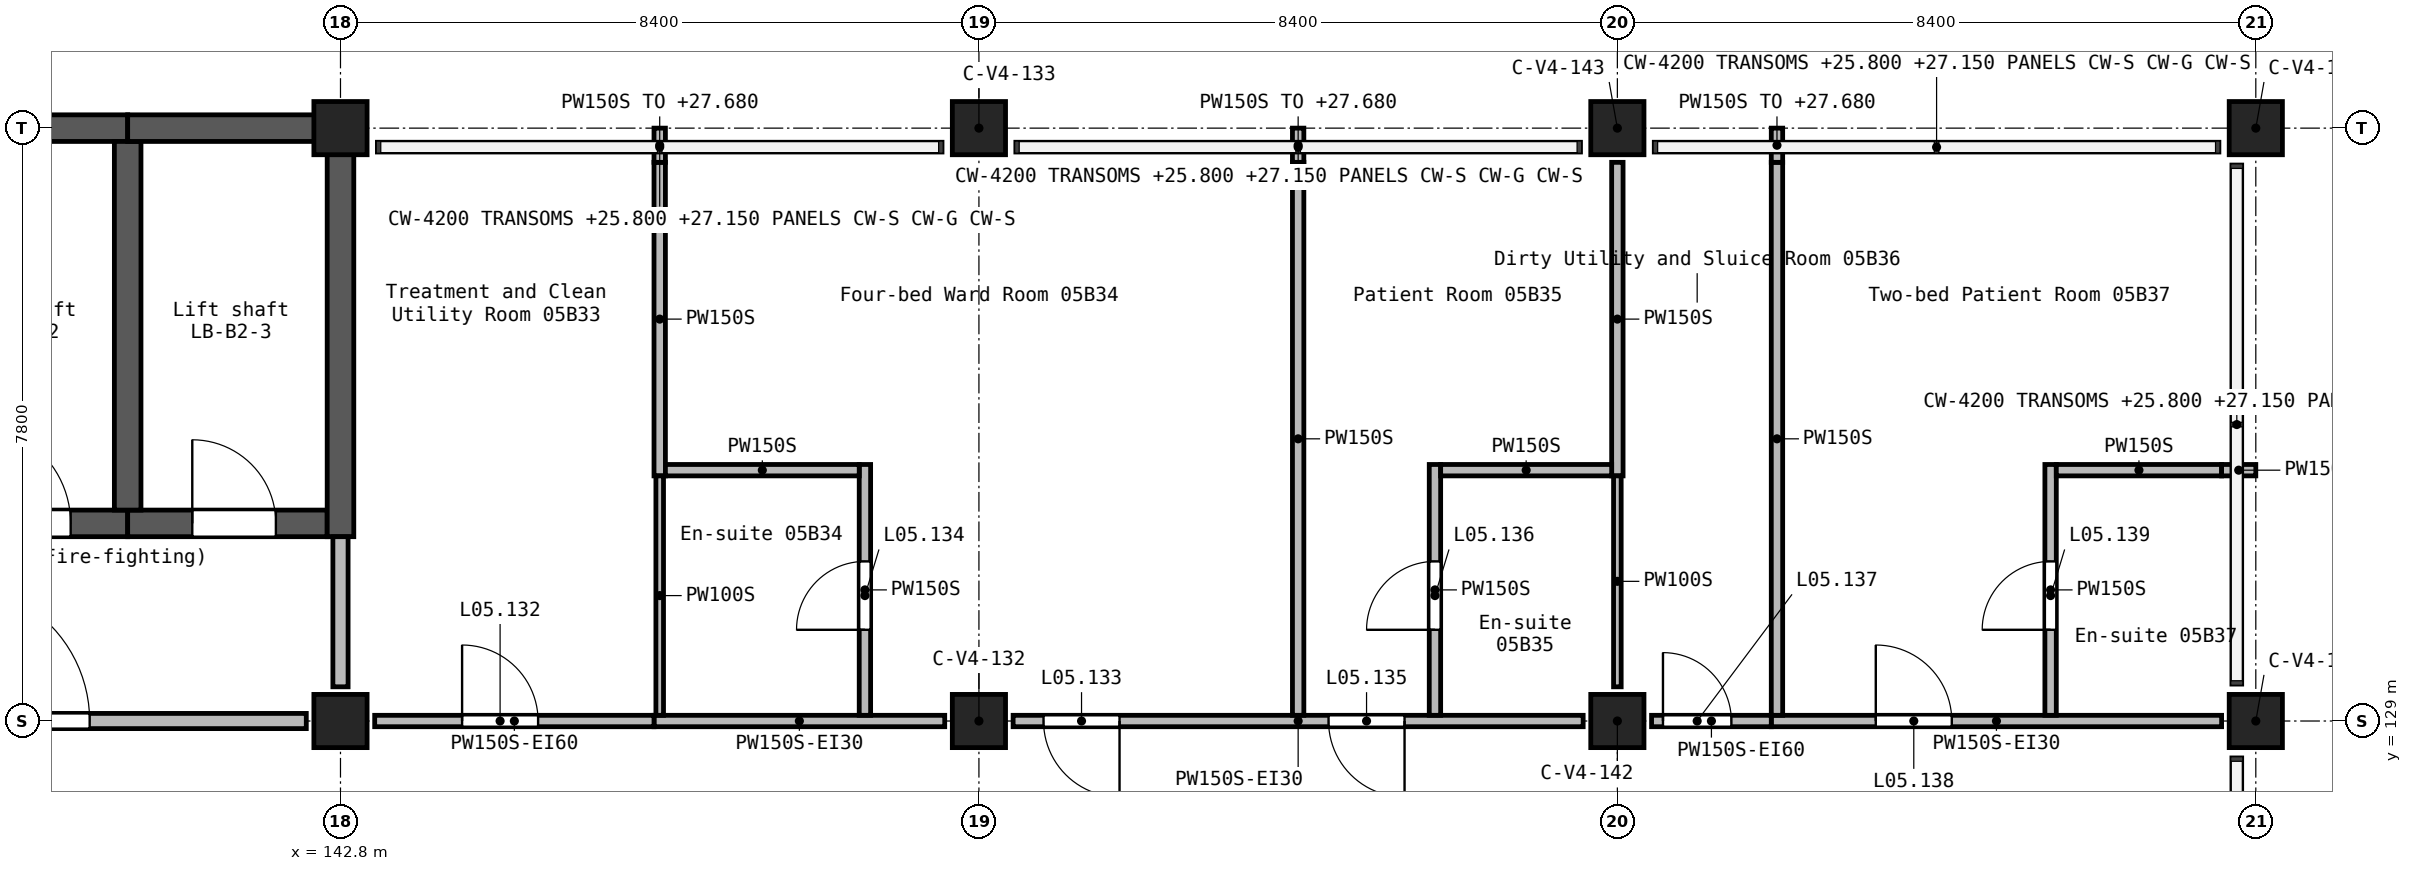
"""IFC4 building model, lengths in metres.
Left out: names, types, materials, properties, quantities, classifications, styles, units other than length and angle.
Written with IfcOpenShell. Run it as: python <this file> out.ifc"""

import sys

from ifc_helpers import new_model, si_unit, direction, frame, frame_2d, origin, origin_2d, place, context, subcontext, project, spatial, rectangle, extrude, element, fill, save


model = new_model("IFC4")
c1 = context("Model", 3, precision=1e-05, world=origin(), true_north=direction((0.0, 1.0)))
c2 = subcontext(c1, "Body", "Model", "MODEL_VIEW")
j1 = project(units=[si_unit("LENGTHUNIT", "METRE"), si_unit("PLANEANGLEUNIT", "RADIAN")], contexts=[c1])
p1 = place(None, origin())
s1 = spatial("IfcSite", under=j1, at=p1, CompositionType="ELEMENT")
p2 = place(p1, origin())
s2 = spatial("IfcBuilding", under=s1, at=p2, CompositionType="ELEMENT")
p3 = place(p2, frame((0.0, 0.0, 24.9)))
s3 = spatial("IfcBuildingStorey", under=s2, at=p3, CompositionType="ELEMENT", Elevation=24.9)
for number, where, z_axis, x_axis in (
    (1, (142.8, 129.0, 0.0), (0.0, 0.0, 1.0), (1.0, 0.0, 0.0)),
    (2, (142.8, 136.8, 0.0), (0.0, 0.0, 1.0), (1.0, 0.0, 0.0)),
    (3, (151.2, 129.0, 0.0), (0.0, 0.0, 1.0), (1.0, 0.0, 0.0)),
    (4, (151.2, 136.8, 0.0), (0.0, 0.0, 1.0), (1.0, 0.0, 0.0)),
    (5, (159.6, 129.0, 0.0), (0.0, 0.0, 1.0), (1.0, 0.0, 0.0)),
    (6, (159.6, 136.8, 0.0), (0.0, 0.0, 1.0), (1.0, 0.0, 0.0)),
    (7, (168.0, 129.0, 0.0), (0.0, 0.0, 1.0), (1.0, 0.0, 0.0)),
    (8, (168.0, 136.8, 0.0), (0.0, 0.0, 1.0), (1.0, 0.0, 0.0)),
):
    element("IfcColumn", number, at=place(p3, frame(where, z_axis=z_axis, x_axis=x_axis)), inside=s3, PredefinedType="COLUMN", context=c2, shape_type="SweptSolid", body=[
        extrude(rectangle(XDim=0.7, YDim=0.7, at=origin_2d()), origin(), (0.0, 0.0, 1.0), 3.9),
    ])
p4 = place(p3, frame((137.2, 131.6, 0.0), z_axis=(0.0, 0.0, 1.0), x_axis=(1.0, 0.0, 0.0)))
e9 = element("IfcWall", 9, at=p4, inside=s3, PredefinedType="SHEAR", context=c2, shape_type="SweptSolid", body=[
    extrude(rectangle(XDim=2.8, YDim=0.35, at=frame_2d((1.4, 0.0))), origin(), (0.0, 0.0, 1.0), 3.9),
])
p5 = place(p4, frame((0.75, 0.0, 0.0)))
e10 = element("IfcOpeningElement", 10, at=p5, cuts=e9, PredefinedType="OPENING", context=c2, shape_type="SweptSolid", body=[
    extrude(rectangle(XDim=1.3, YDim=2.1, at=frame_2d((0.65, 1.05))), frame((0.0, 0.185, 0.0), z_axis=(0.0, -1.0, 0.0), x_axis=(1.0, 0.0, 0.0)), (0.0, 0.0, 1.0), 0.37),
])
p6 = place(p3, frame((137.2, 136.8, 0.0), z_axis=(0.0, 0.0, 1.0), x_axis=(1.0, 0.0, 0.0)))
e11 = element("IfcWall", 11, at=p6, inside=s3, PredefinedType="SHEAR", context=c2, shape_type="SweptSolid", body=[
    extrude(rectangle(XDim=2.8, YDim=0.35, at=frame_2d((1.4, 0.0))), origin(), (0.0, 0.0, 1.0), 3.9),
])
p7 = place(p3, frame((140.0, 131.6, 0.0), z_axis=(0.0, 0.0, 1.0), x_axis=(1.0, 0.0, 0.0)))
e12 = element("IfcWall", 12, at=p7, inside=s3, PredefinedType="SHEAR", context=c2, shape_type="SweptSolid", body=[
    extrude(rectangle(XDim=2.625, YDim=0.35, at=frame_2d((1.312, 0.0))), origin(), (0.0, 0.0, 1.0), 3.9),
])
p8 = place(p7, frame((0.85, 0.0, 0.0)))
e13 = element("IfcOpeningElement", 13, at=p8, cuts=e12, PredefinedType="OPENING", context=c2, shape_type="SweptSolid", body=[
    extrude(rectangle(XDim=1.1, YDim=2.1, at=frame_2d((0.55, 1.05))), frame((0.0, 0.185, 0.0), z_axis=(0.0, -1.0, 0.0), x_axis=(1.0, 0.0, 0.0)), (0.0, 0.0, 1.0), 0.37),
])
p9 = place(p3, frame((140.0, 131.775, 0.0), z_axis=(0.0, 0.0, 1.0), x_axis=(0.0, 1.0, 0.0)))
e14 = element("IfcWall", 14, at=p9, inside=s3, PredefinedType="SHEAR", context=c2, shape_type="SweptSolid", body=[
    extrude(rectangle(XDim=4.85, YDim=0.35, at=frame_2d((2.425, 0.0))), origin(), (0.0, 0.0, 1.0), 3.9),
])
p10 = place(p3, frame((140.0, 136.8, 0.0), z_axis=(0.0, 0.0, 1.0), x_axis=(1.0, 0.0, 0.0)))
e15 = element("IfcWall", 15, at=p10, inside=s3, PredefinedType="SHEAR", context=c2, shape_type="SweptSolid", body=[
    extrude(rectangle(XDim=2.625, YDim=0.35, at=frame_2d((1.312, 0.0))), origin(), (0.0, 0.0, 1.0), 3.9),
])
p11 = place(p3, frame((142.8, 131.425, 0.0), z_axis=(0.0, 0.0, 1.0), x_axis=(0.0, 1.0, 0.0)))
e16 = element("IfcWall", 16, at=p11, inside=s3, PredefinedType="SHEAR", context=c2, shape_type="SweptSolid", body=[
    extrude(rectangle(XDim=5.55, YDim=0.35, at=frame_2d((2.775, 0.0))), origin(), (0.0, 0.0, 1.0), 3.9),
])
p12 = place(p3, frame((134.85, 129.0, 0.0), z_axis=(0.0, 0.0, 1.0), x_axis=(1.0, 0.0, 0.0)))
e17 = element("IfcWall", 17, at=p12, inside=s3, PredefinedType="SOLIDWALL", context=c2, shape_type="SweptSolid", body=[
    extrude(rectangle(XDim=7.5, YDim=0.2, at=frame_2d((3.75, 0.0))), origin(), (0.0, 0.0, 1.0), 3.6),
])
p13 = place(p12, frame((2.85, 0.0, 0.0)))
e18 = element("IfcOpeningElement", 18, at=p13, cuts=e17, PredefinedType="OPENING", context=c2, shape_type="SweptSolid", body=[
    extrude(rectangle(XDim=1.8, YDim=2.1, at=frame_2d((0.9, 1.05))), frame((0.0, 0.11, 0.0), z_axis=(0.0, -1.0, 0.0), x_axis=(1.0, 0.0, 0.0)), (0.0, 0.0, 1.0), 0.22),
])
p14 = place(p3, frame((142.8, 129.45, 0.0), z_axis=(0.0, 0.0, 1.0), x_axis=(0.0, 1.0, 0.0)))
e19 = element("IfcWall", 19, at=p14, inside=s3, PredefinedType="SOLIDWALL", context=c2, shape_type="SweptSolid", body=[
    extrude(rectangle(XDim=1.975, YDim=0.2, at=frame_2d((0.988, 0.0))), origin(), (0.0, 0.0, 1.0), 3.6),
])
p15 = place(p3, frame((159.15, 129.0, 0.0), z_axis=(0.0, 0.0, 1.0), x_axis=(-1.0, 0.0, 0.0)))
e20 = element("IfcWall", 20, at=p15, inside=s3, PredefinedType="PARTITIONING", context=c2, shape_type="SweptSolid", body=[
    extrude(rectangle(XDim=7.5, YDim=0.15, at=frame_2d((3.75, 0.0))), origin(), (0.0, 0.0, 1.0), 3.6),
])
p16 = place(p15, frame((6.1, 0.0, 0.0)))
e21 = element("IfcOpeningElement", 21, at=p16, cuts=e20, PredefinedType="OPENING", context=c2, shape_type="SweptSolid", body=[
    extrude(rectangle(XDim=1.0, YDim=2.1, at=frame_2d((0.5, 1.05))), frame((0.0, 0.085, 0.0), z_axis=(0.0, -1.0, 0.0), x_axis=(1.0, 0.0, 0.0)), (0.0, 0.0, 1.0), 0.17),
])
p17 = place(p15, frame((2.35, 0.0, 0.0)))
e22 = element("IfcOpeningElement", 22, at=p17, cuts=e20, PredefinedType="OPENING", context=c2, shape_type="SweptSolid", body=[
    extrude(rectangle(XDim=1.0, YDim=2.1, at=frame_2d((0.5, 1.05))), frame((0.0, 0.085, 0.0), z_axis=(0.0, -1.0, 0.0), x_axis=(1.0, 0.0, 0.0)), (0.0, 0.0, 1.0), 0.17),
])
p18 = place(p3, frame((150.75, 129.0, 0.0), z_axis=(0.0, 0.0, 1.0), x_axis=(-1.0, 0.0, 0.0)))
e23 = element("IfcWall", 23, at=p18, inside=s3, PredefinedType="PARTITIONING", context=c2, shape_type="SweptSolid", body=[
    extrude(rectangle(XDim=3.825, YDim=0.15, at=frame_2d((1.913, 0.0))), origin(), (0.0, 0.0, 1.0), 3.6),
])
p19 = place(p3, frame((161.625, 129.0, 0.0), z_axis=(0.0, 0.0, 1.0), x_axis=(1.0, 0.0, 0.0)))
e24 = element("IfcWall", 24, at=p19, inside=s3, PredefinedType="PARTITIONING", context=c2, shape_type="SweptSolid", body=[
    extrude(rectangle(XDim=5.925, YDim=0.15, at=frame_2d((2.962, 0.0))), origin(), (0.0, 0.0, 1.0), 3.6),
])
p20 = place(p19, frame((1.375, 0.0, 0.0)))
e25 = element("IfcOpeningElement", 25, at=p20, cuts=e24, PredefinedType="OPENING", context=c2, shape_type="SweptSolid", body=[
    extrude(rectangle(XDim=1.0, YDim=2.1, at=frame_2d((0.5, 1.05))), frame((0.0, 0.085, 0.0), z_axis=(0.0, -1.0, 0.0), x_axis=(1.0, 0.0, 0.0)), (0.0, 0.0, 1.0), 0.17),
])
p21 = place(p3, frame((143.25, 129.0, 0.0), z_axis=(0.0, 0.0, 1.0), x_axis=(1.0, 0.0, 0.0)))
e26 = element("IfcWall", 26, at=p21, inside=s3, PredefinedType="PARTITIONING", context=c2, shape_type="SweptSolid", body=[
    extrude(rectangle(XDim=3.675, YDim=0.15, at=frame_2d((1.837, 0.0))), origin(), (0.0, 0.0, 1.0), 3.6),
])
p22 = place(p21, frame((1.15, 0.0, 0.0)))
e27 = element("IfcOpeningElement", 27, at=p22, cuts=e26, PredefinedType="OPENING", context=c2, shape_type="SweptSolid", body=[
    extrude(rectangle(XDim=1.0, YDim=2.1, at=frame_2d((0.5, 1.05))), frame((0.0, 0.085, 0.0), z_axis=(0.0, -1.0, 0.0), x_axis=(1.0, 0.0, 0.0)), (0.0, 0.0, 1.0), 0.17),
])
p23 = place(p3, frame((160.05, 129.0, 0.0), z_axis=(0.0, 0.0, 1.0), x_axis=(1.0, 0.0, 0.0)))
e28 = element("IfcWall", 28, at=p23, inside=s3, PredefinedType="PARTITIONING", context=c2, shape_type="SweptSolid", body=[
    extrude(rectangle(XDim=1.575, YDim=0.15, at=frame_2d((0.788, 0.0))), origin(), (0.0, 0.0, 1.0), 3.6),
])
p24 = place(p23, frame((0.15, 0.0, 0.0)))
e29 = element("IfcOpeningElement", 29, at=p24, cuts=e28, PredefinedType="OPENING", context=c2, shape_type="SweptSolid", body=[
    extrude(rectangle(XDim=0.9, YDim=2.1, at=frame_2d((0.45, 1.05))), frame((0.0, 0.085, 0.0), z_axis=(0.0, -1.0, 0.0), x_axis=(1.0, 0.0, 0.0)), (0.0, 0.0, 1.0), 0.17),
])
p25 = place(p3, frame((155.4, 129.075, 0.0), z_axis=(0.0, 0.0, 1.0), x_axis=(0.0, 1.0, 0.0)))
e30 = element("IfcWall", 30, at=p25, inside=s3, PredefinedType="PARTITIONING", context=c2, shape_type="SweptSolid", body=[
    extrude(rectangle(XDim=7.275, YDim=0.15, at=frame_2d((3.638, 0.0))), origin(), (0.0, 0.0, 1.0), 3.6),
])
p26 = place(p3, frame((155.4, 136.35, 0.0), z_axis=(0.0, 0.0, 1.0), x_axis=(0.0, 1.0, 0.0)))
e31 = element("IfcWall", 31, at=p26, inside=s3, PredefinedType="PARTITIONING", context=c2, shape_type="SweptSolid", body=[
    extrude(rectangle(XDim=0.45, YDim=0.15, at=frame_2d((0.225, 0.0))), origin(), (0.0, 0.0, 1.0), 2.78),
])
p27 = place(p3, frame((161.7, 129.075, 0.0), z_axis=(0.0, 0.0, 1.0), x_axis=(0.0, 1.0, 0.0)))
e32 = element("IfcWall", 32, at=p27, inside=s3, PredefinedType="PARTITIONING", context=c2, shape_type="SweptSolid", body=[
    extrude(rectangle(XDim=7.275, YDim=0.15, at=frame_2d((3.638, 0.0))), origin(), (0.0, 0.0, 1.0), 3.6),
])
p28 = place(p3, frame((161.7, 136.35, 0.0), z_axis=(0.0, 0.0, 1.0), x_axis=(0.0, 1.0, 0.0)))
e33 = element("IfcWall", 33, at=p28, inside=s3, PredefinedType="PARTITIONING", context=c2, shape_type="SweptSolid", body=[
    extrude(rectangle(XDim=0.45, YDim=0.15, at=frame_2d((0.225, 0.0))), origin(), (0.0, 0.0, 1.0), 2.78),
])
p29 = place(p3, frame((147.0, 132.225, 0.0), z_axis=(0.0, 0.0, 1.0), x_axis=(0.0, 1.0, 0.0)))
e34 = element("IfcWall", 34, at=p29, inside=s3, PredefinedType="PARTITIONING", context=c2, shape_type="SweptSolid", body=[
    extrude(rectangle(XDim=4.125, YDim=0.15, at=frame_2d((2.062, 0.0))), origin(), (0.0, 0.0, 1.0), 3.6),
])
p30 = place(p3, frame((147.0, 136.35, 0.0), z_axis=(0.0, 0.0, 1.0), x_axis=(0.0, 1.0, 0.0)))
e35 = element("IfcWall", 35, at=p30, inside=s3, PredefinedType="PARTITIONING", context=c2, shape_type="SweptSolid", body=[
    extrude(rectangle(XDim=0.45, YDim=0.15, at=frame_2d((0.225, 0.0))), origin(), (0.0, 0.0, 1.0), 2.78),
])
p31 = place(p3, frame((159.6, 132.225, 0.0), z_axis=(0.0, 0.0, 1.0), x_axis=(0.0, 1.0, 0.0)))
e36 = element("IfcWall", 36, at=p31, inside=s3, PredefinedType="PARTITIONING", context=c2, shape_type="SweptSolid", body=[
    extrude(rectangle(XDim=4.125, YDim=0.15, at=frame_2d((2.062, 0.0))), origin(), (0.0, 0.0, 1.0), 3.6),
])
p32 = place(p3, frame((149.7, 129.075, 0.0), z_axis=(0.0, 0.0, 1.0), x_axis=(0.0, 1.0, 0.0)))
e37 = element("IfcWall", 37, at=p32, inside=s3, PredefinedType="PARTITIONING", context=c2, shape_type="SweptSolid", body=[
    extrude(rectangle(XDim=3.3, YDim=0.15, at=frame_2d((1.65, 0.0))), origin(), (0.0, 0.0, 1.0), 3.6),
])
p33 = place(p32, frame((1.125, 0.0, 0.0)))
e38 = element("IfcOpeningElement", 38, at=p33, cuts=e37, PredefinedType="OPENING", context=c2, shape_type="SweptSolid", body=[
    extrude(rectangle(XDim=0.9, YDim=2.1, at=frame_2d((0.45, 1.05))), frame((0.0, 0.085, 0.0), z_axis=(0.0, -1.0, 0.0), x_axis=(1.0, 0.0, 0.0)), (0.0, 0.0, 1.0), 0.17),
])
p34 = place(p3, frame((157.2, 129.075, 0.0), z_axis=(0.0, 0.0, 1.0), x_axis=(0.0, 1.0, 0.0)))
e39 = element("IfcWall", 39, at=p34, inside=s3, PredefinedType="PARTITIONING", context=c2, shape_type="SweptSolid", body=[
    extrude(rectangle(XDim=3.3, YDim=0.15, at=frame_2d((1.65, 0.0))), origin(), (0.0, 0.0, 1.0), 3.6),
])
p35 = place(p34, frame((1.125, 0.0, 0.0)))
e40 = element("IfcOpeningElement", 40, at=p35, cuts=e39, PredefinedType="OPENING", context=c2, shape_type="SweptSolid", body=[
    extrude(rectangle(XDim=0.9, YDim=2.1, at=frame_2d((0.45, 1.05))), frame((0.0, 0.085, 0.0), z_axis=(0.0, -1.0, 0.0), x_axis=(1.0, 0.0, 0.0)), (0.0, 0.0, 1.0), 0.17),
])
p36 = place(p3, frame((165.3, 129.075, 0.0), z_axis=(0.0, 0.0, 1.0), x_axis=(0.0, 1.0, 0.0)))
e41 = element("IfcWall", 41, at=p36, inside=s3, PredefinedType="PARTITIONING", context=c2, shape_type="SweptSolid", body=[
    extrude(rectangle(XDim=3.3, YDim=0.15, at=frame_2d((1.65, 0.0))), origin(), (0.0, 0.0, 1.0), 3.6),
])
p37 = place(p36, frame((1.125, 0.0, 0.0)))
e42 = element("IfcOpeningElement", 42, at=p37, cuts=e41, PredefinedType="OPENING", context=c2, shape_type="SweptSolid", body=[
    extrude(rectangle(XDim=0.9, YDim=2.1, at=frame_2d((0.45, 1.05))), frame((0.0, 0.085, 0.0), z_axis=(0.0, -1.0, 0.0), x_axis=(1.0, 0.0, 0.0)), (0.0, 0.0, 1.0), 0.17),
])
p38 = place(p3, frame((147.075, 132.3, 0.0), z_axis=(0.0, 0.0, 1.0), x_axis=(1.0, 0.0, 0.0)))
e43 = element("IfcWall", 43, at=p38, inside=s3, PredefinedType="PARTITIONING", context=c2, shape_type="SweptSolid", body=[
    extrude(rectangle(XDim=2.55, YDim=0.15, at=frame_2d((1.275, 0.0))), origin(), (0.0, 0.0, 1.0), 3.6),
])
p39 = place(p3, frame((165.375, 132.3, 0.0), z_axis=(0.0, 0.0, 1.0), x_axis=(1.0, 0.0, 0.0)))
e44 = element("IfcWall", 44, at=p39, inside=s3, PredefinedType="PARTITIONING", context=c2, shape_type="SweptSolid", body=[
    extrude(rectangle(XDim=2.175, YDim=0.15, at=frame_2d((1.087, 0.0))), origin(), (0.0, 0.0, 1.0), 3.6),
])
p40 = place(p3, frame((167.55, 132.3, 0.0), z_axis=(0.0, 0.0, 1.0), x_axis=(1.0, 0.0, 0.0)))
e45 = element("IfcWall", 45, at=p40, inside=s3, PredefinedType="PARTITIONING", context=c2, shape_type="SweptSolid", body=[
    extrude(rectangle(XDim=0.45, YDim=0.15, at=frame_2d((0.225, 0.0))), origin(), (0.0, 0.0, 1.0), 2.78),
])
p41 = place(p3, frame((157.275, 132.3, 0.0), z_axis=(0.0, 0.0, 1.0), x_axis=(1.0, 0.0, 0.0)))
e46 = element("IfcWall", 46, at=p41, inside=s3, PredefinedType="PARTITIONING", context=c2, shape_type="SweptSolid", body=[
    extrude(rectangle(XDim=2.25, YDim=0.15, at=frame_2d((1.125, 0.0))), origin(), (0.0, 0.0, 1.0), 3.6),
])
p42 = place(p3, frame((147.0, 129.075, 0.0), z_axis=(0.0, 0.0, 1.0), x_axis=(0.0, 1.0, 0.0)))
e47 = element("IfcWall", 47, at=p42, inside=s3, PredefinedType="PARTITIONING", context=c2, shape_type="SweptSolid", body=[
    extrude(rectangle(XDim=3.15, YDim=0.1, at=frame_2d((1.575, 0.0))), origin(), (0.0, 0.0, 1.0), 3.6),
])
p43 = place(p3, frame((159.6, 129.45, 0.0), z_axis=(0.0, 0.0, 1.0), x_axis=(0.0, 1.0, 0.0)))
e48 = element("IfcWall", 48, at=p43, inside=s3, PredefinedType="PARTITIONING", context=c2, shape_type="SweptSolid", body=[
    extrude(rectangle(XDim=2.775, YDim=0.1, at=frame_2d((1.388, 0.0))), origin(), (0.0, 0.0, 1.0), 3.6),
])
p44 = place(p22, origin())
e49 = element("IfcDoor", 49, at=p44, inside=s3, OperationType="SINGLE_SWING_LEFT", PredefinedType="DOOR", context=c2, shape_type="SweptSolid", body=[
    extrude(rectangle(XDim=1.0, YDim=2.1, at=frame_2d((0.5, 1.05))), frame((0.0, 0.025, 0.0), z_axis=(0.0, -1.0, 0.0), x_axis=(1.0, 0.0, 0.0)), (0.0, 0.0, 1.0), 0.05),
])
fill(e27, e49)
p45 = place(p16, frame((1.0, 0.0, 0.0), z_axis=(0.0, 0.0, 1.0), x_axis=(-1.0, 0.0, 0.0)))
e50 = element("IfcDoor", 50, at=p45, inside=s3, OperationType="SINGLE_SWING_LEFT", PredefinedType="DOOR", context=c2, shape_type="SweptSolid", body=[
    extrude(rectangle(XDim=1.0, YDim=2.1, at=frame_2d((0.5, 1.05))), frame((0.0, 0.025, 0.0), z_axis=(0.0, -1.0, 0.0), x_axis=(1.0, 0.0, 0.0)), (0.0, 0.0, 1.0), 0.05),
])
fill(e21, e50)
p46 = place(p33, origin())
e51 = element("IfcDoor", 51, at=p46, inside=s3, OperationType="SINGLE_SWING_LEFT", PredefinedType="DOOR", context=c2, shape_type="SweptSolid", body=[
    extrude(rectangle(XDim=0.9, YDim=2.1, at=frame_2d((0.45, 1.05))), frame((0.0, 0.025, 0.0), z_axis=(0.0, -1.0, 0.0), x_axis=(1.0, 0.0, 0.0)), (0.0, 0.0, 1.0), 0.05),
])
fill(e38, e51)
p47 = place(p17, frame((1.0, 0.0, 0.0), z_axis=(0.0, 0.0, 1.0), x_axis=(-1.0, 0.0, 0.0)))
e52 = element("IfcDoor", 52, at=p47, inside=s3, OperationType="SINGLE_SWING_RIGHT", PredefinedType="DOOR", context=c2, shape_type="SweptSolid", body=[
    extrude(rectangle(XDim=1.0, YDim=2.1, at=frame_2d((0.5, 1.05))), frame((0.0, 0.025, 0.0), z_axis=(0.0, -1.0, 0.0), x_axis=(1.0, 0.0, 0.0)), (0.0, 0.0, 1.0), 0.05),
])
fill(e22, e52)
p48 = place(p35, frame((0.9, 0.0, 0.0), z_axis=(0.0, 0.0, 1.0), x_axis=(-1.0, 0.0, 0.0)))
e53 = element("IfcDoor", 53, at=p48, inside=s3, OperationType="SINGLE_SWING_RIGHT", PredefinedType="DOOR", context=c2, shape_type="SweptSolid", body=[
    extrude(rectangle(XDim=0.9, YDim=2.1, at=frame_2d((0.45, 1.05))), frame((0.0, 0.025, 0.0), z_axis=(0.0, -1.0, 0.0), x_axis=(1.0, 0.0, 0.0)), (0.0, 0.0, 1.0), 0.05),
])
fill(e40, e53)
p49 = place(p24, origin())
e54 = element("IfcDoor", 54, at=p49, inside=s3, OperationType="SINGLE_SWING_LEFT", PredefinedType="DOOR", context=c2, shape_type="SweptSolid", body=[
    extrude(rectangle(XDim=0.9, YDim=2.1, at=frame_2d((0.45, 1.05))), frame((0.0, 0.025, 0.0), z_axis=(0.0, -1.0, 0.0), x_axis=(1.0, 0.0, 0.0)), (0.0, 0.0, 1.0), 0.05),
])
fill(e29, e54)
p50 = place(p20, origin())
e55 = element("IfcDoor", 55, at=p50, inside=s3, OperationType="SINGLE_SWING_LEFT", PredefinedType="DOOR", context=c2, shape_type="SweptSolid", body=[
    extrude(rectangle(XDim=1.0, YDim=2.1, at=frame_2d((0.5, 1.05))), frame((0.0, 0.025, 0.0), z_axis=(0.0, -1.0, 0.0), x_axis=(1.0, 0.0, 0.0)), (0.0, 0.0, 1.0), 0.05),
])
fill(e25, e55)
p51 = place(p37, frame((0.9, 0.0, 0.0), z_axis=(0.0, 0.0, 1.0), x_axis=(-1.0, 0.0, 0.0)))
e56 = element("IfcDoor", 56, at=p51, inside=s3, OperationType="SINGLE_SWING_RIGHT", PredefinedType="DOOR", context=c2, shape_type="SweptSolid", body=[
    extrude(rectangle(XDim=0.9, YDim=2.1, at=frame_2d((0.45, 1.05))), frame((0.0, 0.025, 0.0), z_axis=(0.0, -1.0, 0.0), x_axis=(1.0, 0.0, 0.0)), (0.0, 0.0, 1.0), 0.05),
])
fill(e42, e56)
p52 = place(p13, origin())
e57 = element("IfcDoor", 57, at=p52, inside=s3, OperationType="DOUBLE_DOOR_SINGLE_SWING", PredefinedType="DOOR", context=c2, shape_type="SweptSolid", body=[
    extrude(rectangle(XDim=1.8, YDim=2.1, at=frame_2d((0.9, 1.05))), frame((0.0, 0.025, 0.0), z_axis=(0.0, -1.0, 0.0), x_axis=(1.0, 0.0, 0.0)), (0.0, 0.0, 1.0), 0.05),
])
fill(e18, e57)
p53 = place(p5, origin())
e58 = element("IfcDoor", 58, at=p53, inside=s3, OperationType="DOUBLE_DOOR_SLIDING", PredefinedType="DOOR", context=c2, shape_type="SweptSolid", body=[
    extrude(rectangle(XDim=1.3, YDim=2.1, at=frame_2d((0.65, 1.05))), frame((0.0, 0.025, 0.0), z_axis=(0.0, -1.0, 0.0), x_axis=(1.0, 0.0, 0.0)), (0.0, 0.0, 1.0), 0.05),
])
fill(e10, e58)
p54 = place(p8, origin())
e59 = element("IfcDoor", 59, at=p54, inside=s3, OperationType="DOUBLE_DOOR_SLIDING", PredefinedType="DOOR", context=c2, shape_type="SweptSolid", body=[
    extrude(rectangle(XDim=1.1, YDim=2.1, at=frame_2d((0.55, 1.05))), frame((0.0, 0.025, 0.0), z_axis=(0.0, -1.0, 0.0), x_axis=(1.0, 0.0, 0.0)), (0.0, 0.0, 1.0), 0.05),
])
fill(e13, e59)
save(model, sys.argv[1])
